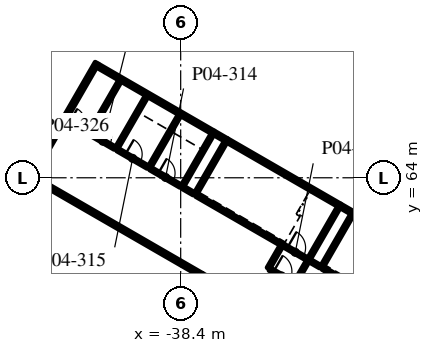
"""IFC4 building model, lengths in metres.
Left out: names, types, materials, properties, quantities, classifications, styles, units other than length and angle.
Written with IfcOpenShell. Run it as: python <this file> out.ifc"""

import sys

from ifc_helpers import new_model, si_unit, direction, frame, frame_2d, origin, place, context, subcontext, project, spatial, rectangle, extrude, element, fill, save


model = new_model("IFC4")
c1 = context("Model", 3, precision=1e-05, world=origin(), true_north=direction((0.0, 1.0)))
c2 = subcontext(c1, "Body", "Model", "MODEL_VIEW")
j1 = project(units=[si_unit("LENGTHUNIT", "METRE"), si_unit("PLANEANGLEUNIT", "RADIAN")], contexts=[c1])
p1 = place(None, origin())
s1 = spatial("IfcSite", under=j1, at=p1, CompositionType="ELEMENT")
p2 = place(p1, origin())
s2 = spatial("IfcBuilding", under=s1, at=p2, CompositionType="ELEMENT")
p3 = place(p2, frame((0.0, 0.0, 21.6)))
s3 = spatial("IfcBuildingStorey", under=s2, at=p3, CompositionType="ELEMENT", Elevation=21.6)
p4 = place(p3, frame((-48.228, 64.073, 0.0), z_axis=(0.0, 0.0, 1.0), x_axis=(0.499999331568, 0.866025789703, 0.0)))
e1 = element("IfcWall", 1, at=p4, inside=s3, PredefinedType="SOLIDWALL", context=c2, shape_type="SweptSolid", body=[
    extrude(rectangle(XDim=8.625, YDim=0.25, at=frame_2d((4.312, 0.0))), origin(), (0.0, 0.0, 1.0), 4.5),
])
p5 = place(p3, frame((-27.069, 61.672, 0.0), z_axis=(0.0, 0.0, 1.0), x_axis=(0.866021068297, -0.500007509209, 0.0)))
e2 = element("IfcWall", 2, at=p5, inside=s3, PredefinedType="SOLIDWALL", context=c2, shape_type="SweptSolid", body=[
    extrude(rectangle(XDim=8.6, YDim=0.25, at=frame_2d((4.3, 0.0))), origin(), (0.0, 0.0, 1.0), 4.5),
])
p6 = place(p3, frame((-35.383, 66.472, 0.0), z_axis=(0.0, 0.0, 1.0), x_axis=(0.866028165386, -0.499995216735, 0.0)))
e3 = element("IfcWall", 3, at=p6, inside=s3, PredefinedType="SOLIDWALL", context=c2, shape_type="SweptSolid", body=[
    extrude(rectangle(XDim=8.6, YDim=0.25, at=frame_2d((4.3, 0.0))), origin(), (0.0, 0.0, 1.0), 4.5),
])
p7 = place(p3, frame((-43.869, 71.372, 0.0), z_axis=(0.0, 0.0, 1.0), x_axis=(0.866025267465, -0.500000236112, 0.0)))
e4 = element("IfcWall", 4, at=p7, inside=s3, PredefinedType="SOLIDWALL", context=c2, shape_type="SweptSolid", body=[
    extrude(rectangle(XDim=8.8, YDim=0.25, at=frame_2d((4.4, 0.0))), origin(), (0.0, 0.0, 1.0), 4.5),
])
p8 = place(p3, frame((-48.119, 64.01, 0.0), z_axis=(0.0, 0.0, 1.0), x_axis=(0.866025499775, -0.499999833739, 0.0)))
e5 = element("IfcWall", 5, at=p8, inside=s3, PredefinedType="SOLIDWALL", context=c2, shape_type="SweptSolid", body=[
    extrude(rectangle(XDim=12.8, YDim=0.25, at=frame_2d((6.4, 0.0))), origin(), (0.0, 0.0, 1.0), 4.5),
])
for number, where, z_axis, x_axis in (
    (6, (-27.935, 62.172, 0.0), (0.0, 0.0, 1.0), (0.866, -0.5, 0.0)),
    (7, (-36.249, 66.972, 0.0), (0.0, 0.0, 1.0), (0.866, -0.5, 0.0)),
):
    element("IfcWall", number, at=place(p3, frame(where, z_axis=z_axis, x_axis=x_axis)), inside=s3, PredefinedType="SOLIDWALL", context=c2, shape_type="SweptSolid", body=[
        extrude(rectangle(XDim=1.0, YDim=0.25, at=frame_2d((0.5, 0.0))), origin(), (0.0, 0.0, 1.0), 4.5),
    ])
for number, where, z_axis, x_axis in (
    (8, (-27.131, 61.563, 0.0), (0.0, 0.0, 1.0), (-0.5, -0.866, 0.0)),
    (9, (-27.997, 62.063, 0.0), (0.0, 0.0, 1.0), (-0.5, -0.866, 0.0)),
    (10, (-35.445, 66.364, 0.0), (0.0, 0.0, 1.0), (-0.5, -0.866, 0.0)),
):
    element("IfcWall", number, at=place(p3, frame(where, z_axis=z_axis, x_axis=x_axis)), inside=s3, PredefinedType="SOLIDWALL", context=c2, shape_type="SweptSolid", body=[
        extrude(rectangle(XDim=4.0, YDim=0.2, at=frame_2d((2.0, 0.0))), origin(), (0.0, 0.0, 1.0), 4.5),
    ])
p9 = place(p3, frame((-23.285, 54.724, 0.0), z_axis=(0.0, 0.0, 1.0), x_axis=(-0.866027239912, 0.49999681972, 0.0)))
e11 = element("IfcWall", 11, at=p9, inside=s3, PredefinedType="SOLIDWALL", context=c2, shape_type="SweptSolid", body=[
    extrude(rectangle(XDim=6.65, YDim=0.2, at=frame_2d((3.325, 0.0))), origin(), (0.0, 0.0, 1.0), 4.5),
])
p10 = place(p3, frame((-31.599, 59.524, 0.0), z_axis=(0.0, 0.0, 1.0), x_axis=(0.866036909293, -0.499980071345, 0.0)))
e12 = element("IfcWall", 12, at=p10, inside=s3, PredefinedType="SOLIDWALL", context=c2, shape_type="SweptSolid", body=[
    extrude(rectangle(XDim=1.75, YDim=0.2, at=frame_2d((0.875, 0.0))), origin(), (0.0, 0.0, 1.0), 4.5),
])
p11 = place(p10, frame((0.25, 0.0, 0.0)))
e13 = element("IfcOpeningElement", 13, at=p11, cuts=e12, PredefinedType="OPENING", context=c2, shape_type="SweptSolid", body=[
    extrude(rectangle(XDim=1.2, YDim=2.1, at=frame_2d((0.6, 1.05))), frame((0.0, 0.11, 0.0), z_axis=(0.0, -1.0, 0.0), x_axis=(1.0, 0.0, 0.0)), (0.0, 0.0, 1.0), 0.22),
])
p12 = place(p3, frame((-31.599, 59.524, 0.0), z_axis=(0.0, 0.0, 1.0), x_axis=(-0.866027239912, 0.49999681972, 0.0)))
e14 = element("IfcWall", 14, at=p12, inside=s3, PredefinedType="SOLIDWALL", context=c2, shape_type="SweptSolid", body=[
    extrude(rectangle(XDim=6.65, YDim=0.2, at=frame_2d((3.325, 0.0))), origin(), (0.0, 0.0, 1.0), 4.5),
])
for number, where, z_axis, x_axis in (
    (15, (-36.311, 66.864, 0.0), (0.0, 0.0, 1.0), (-0.5, -0.866, 0.0)),
    (16, (-38.476, 68.114, 0.0), (0.0, 0.0, 1.0), (-0.5, -0.866, 0.0)),
    (17, (-40.641, 69.364, 0.0), (0.0, 0.0, 1.0), (-0.5, -0.866, 0.0)),
):
    element("IfcWall", number, at=place(p3, frame(where, z_axis=z_axis, x_axis=x_axis)), inside=s3, PredefinedType="SOLIDWALL", context=c2, shape_type="SweptSolid", body=[
        extrude(rectangle(XDim=4.0, YDim=0.2, at=frame_2d((2.0, 0.0))), origin(), (0.0, 0.0, 1.0), 4.5),
    ])
p13 = place(p3, frame((-40.389, 64.599, 0.0), z_axis=(0.0, 0.0, 1.0), x_axis=(0.86602648383, -0.499998129301, 0.0)))
e18 = element("IfcWall", 18, at=p13, inside=s3, PredefinedType="SOLIDWALL", context=c2, shape_type="SweptSolid", body=[
    extrude(rectangle(XDim=2.3, YDim=0.2, at=frame_2d((1.15, 0.0))), origin(), (0.0, 0.0, 1.0), 4.5),
])
p14 = place(p13, frame((0.6, 0.0, 0.0)))
e19 = element("IfcOpeningElement", 19, at=p14, cuts=e18, PredefinedType="OPENING", context=c2, shape_type="SweptSolid", body=[
    extrude(rectangle(XDim=1.1, YDim=2.1, at=frame_2d((0.55, 1.05))), frame((0.0, 0.11, 0.0), z_axis=(0.0, -1.0, 0.0), x_axis=(1.0, 0.0, 0.0)), (0.0, 0.0, 1.0), 0.22),
])
p15 = place(p3, frame((-42.554, 65.849, 0.0), z_axis=(0.0, 0.0, 1.0), x_axis=(0.86602648383, -0.499998129301, 0.0)))
e20 = element("IfcWall", 20, at=p15, inside=s3, PredefinedType="SOLIDWALL", context=c2, shape_type="SweptSolid", body=[
    extrude(rectangle(XDim=2.3, YDim=0.2, at=frame_2d((1.15, 0.0))), origin(), (0.0, 0.0, 1.0), 4.5),
])
p16 = place(p15, frame((0.6, 0.0, 0.0)))
e21 = element("IfcOpeningElement", 21, at=p16, cuts=e20, PredefinedType="OPENING", context=c2, shape_type="SweptSolid", body=[
    extrude(rectangle(XDim=1.1, YDim=2.1, at=frame_2d((0.55, 1.05))), frame((0.0, 0.11, 0.0), z_axis=(0.0, -1.0, 0.0), x_axis=(1.0, 0.0, 0.0)), (0.0, 0.0, 1.0), 0.22),
])
for number, where, z_axis, x_axis in (
    (22, (-30.047, 58.513, 0.0), (0.0, 0.0, 1.0), (-0.5, -0.866, 0.0)),
    (23, (-31.779, 59.513, 0.0), (0.0, 0.0, 1.0), (-0.5, -0.866, 0.0)),
):
    element("IfcWall", number, at=place(p3, frame(where, z_axis=z_axis, x_axis=x_axis)), inside=s3, PredefinedType="PARTITIONING", context=c2, shape_type="SweptSolid", body=[
        extrude(rectangle(XDim=1.7, YDim=0.2, at=frame_2d((0.85, 0.0))), origin(), (0.0, 0.0, 1.0), 4.5),
    ])
p17 = place(p3, frame((-32.542, 57.99, 0.0), z_axis=(0.0, 0.0, 1.0), x_axis=(0.866047807691, -0.499961193289, 0.0)))
e24 = element("IfcWall", 24, at=p17, inside=s3, PredefinedType="PARTITIONING", context=c2, shape_type="SweptSolid", body=[
    extrude(rectangle(XDim=1.8, YDim=0.2, at=frame_2d((0.9, 0.0))), origin(), (0.0, 0.0, 1.0), 4.5),
])
p18 = place(p17, frame((0.3, 0.0, 0.0)))
e25 = element("IfcOpeningElement", 25, at=p18, cuts=e24, PredefinedType="OPENING", context=c2, shape_type="SweptSolid", body=[
    extrude(rectangle(XDim=1.2, YDim=2.1, at=frame_2d((0.6, 1.05))), frame((0.0, 0.11, 0.0), z_axis=(0.0, -1.0, 0.0), x_axis=(1.0, 0.0, 0.0)), (0.0, 0.0, 1.0), 0.22),
])
p19 = place(p3, frame((-42.395, 70.376, 0.0), z_axis=(0.0, 0.0, 1.0), x_axis=(-0.49999894854, -0.866026010844, 0.0)))
e26 = element("IfcWall", 26, at=p19, inside=s3, PredefinedType="PARTITIONING", context=c2, shape_type="SweptSolid", body=[
    extrude(rectangle(XDim=4.0, YDim=0.2, at=frame_2d((2.0, 0.0))), origin(), (0.0, 0.0, 1.0), 4.5),
])
p20 = place(p3, frame((-44.308, 66.862, 0.0), z_axis=(0.0, 0.0, 1.0), x_axis=(0.866036312054, -0.499981105847, 0.0)))
e27 = element("IfcWall", 27, at=p20, inside=s3, PredefinedType="PARTITIONING", context=c2, shape_type="SweptSolid", body=[
    extrude(rectangle(XDim=1.825, YDim=0.2, at=frame_2d((0.912, 0.0))), origin(), (0.0, 0.0, 1.0), 4.5),
])
p21 = place(p20, frame((0.413, 0.0, 0.0)))
e28 = element("IfcOpeningElement", 28, at=p21, cuts=e27, PredefinedType="OPENING", context=c2, shape_type="SweptSolid", body=[
    extrude(rectangle(XDim=1.0, YDim=2.1, at=frame_2d((0.5, 1.05))), frame((0.0, 0.11, 0.0), z_axis=(0.0, -1.0, 0.0), x_axis=(1.0, 0.0, 0.0)), (0.0, 0.0, 1.0), 0.22),
])
p22 = place(p3, frame((-45.932, 67.799, 0.0), z_axis=(0.0, 0.0, 1.0), x_axis=(0.866027799164, -0.499995851058, 0.0)))
e29 = element("IfcWall", 29, at=p22, inside=s3, PredefinedType="PARTITIONING", context=c2, shape_type="SweptSolid", body=[
    extrude(rectangle(XDim=1.675, YDim=0.2, at=frame_2d((0.837, 0.0))), origin(), (0.0, 0.0, 1.0), 4.5),
])
p23 = place(p22, frame((0.262, 0.0, 0.0)))
e30 = element("IfcOpeningElement", 30, at=p23, cuts=e29, PredefinedType="OPENING", context=c2, shape_type="SweptSolid", body=[
    extrude(rectangle(XDim=1.0, YDim=2.1, at=frame_2d((0.5, 1.05))), frame((0.0, 0.11, 0.0), z_axis=(0.0, -1.0, 0.0), x_axis=(1.0, 0.0, 0.0)), (0.0, 0.0, 1.0), 0.22),
])
p24 = place(p3, frame((-29.218, 58.149, 0.0), z_axis=(0.0, 0.0, 1.0), x_axis=(-0.866017831539, 0.500013115284, 0.0)))
e31 = element("IfcWall", 31, at=p24, inside=s3, PredefinedType="PARTITIONING", context=c2, shape_type="SweptSolid", body=[
    extrude(rectangle(XDim=0.8, YDim=0.2, at=frame_2d((0.4, 0.0))), origin(), (0.0, 0.0, 1.0), 4.5),
])
p25 = place(p3, frame((-37.531, 62.949, 0.0), z_axis=(0.0, 0.0, 1.0), x_axis=(-0.866094119867, 0.499880961361, 0.0)))
e32 = element("IfcWall", 32, at=p25, inside=s3, PredefinedType="PARTITIONING", context=c2, shape_type="SweptSolid", body=[
    extrude(rectangle(XDim=0.8, YDim=0.2, at=frame_2d((0.4, 0.0))), origin(), (0.0, 0.0, 1.0), 4.5),
])
p26 = place(p11, origin())
e33 = element("IfcDoor", 33, at=p26, inside=s3, OperationType="SINGLE_SWING_LEFT", PredefinedType="DOOR", context=c2, shape_type="SweptSolid", body=[
    extrude(rectangle(XDim=1.2, YDim=2.1, at=frame_2d((0.6, 1.05))), frame((0.0, 0.025, 0.0), z_axis=(0.0, -1.0, 0.0), x_axis=(1.0, 0.0, 0.0)), (0.0, 0.0, 1.0), 0.05),
])
fill(e13, e33)
p27 = place(p14, origin())
e34 = element("IfcDoor", 34, at=p27, inside=s3, OperationType="DOUBLE_DOOR_SLIDING", PredefinedType="DOOR", context=c2, shape_type="SweptSolid", body=[
    extrude(rectangle(XDim=1.1, YDim=2.1, at=frame_2d((0.55, 1.05))), frame((0.0, 0.025, 0.0), z_axis=(0.0, -1.0, 0.0), x_axis=(1.0, 0.0, 0.0)), (0.0, 0.0, 1.0), 0.05),
])
fill(e19, e34)
p28 = place(p16, origin())
e35 = element("IfcDoor", 35, at=p28, inside=s3, OperationType="DOUBLE_DOOR_SLIDING", PredefinedType="DOOR", context=c2, shape_type="SweptSolid", body=[
    extrude(rectangle(XDim=1.1, YDim=2.1, at=frame_2d((0.55, 1.05))), frame((0.0, 0.025, 0.0), z_axis=(0.0, -1.0, 0.0), x_axis=(1.0, 0.0, 0.0)), (0.0, 0.0, 1.0), 0.05),
])
fill(e21, e35)
p29 = place(p18, origin())
e36 = element("IfcDoor", 36, at=p29, inside=s3, OperationType="SINGLE_SWING_LEFT", PredefinedType="DOOR", context=c2, shape_type="SweptSolid", body=[
    extrude(rectangle(XDim=1.2, YDim=2.1, at=frame_2d((0.6, 1.05))), frame((0.0, 0.025, 0.0), z_axis=(0.0, -1.0, 0.0), x_axis=(1.0, 0.0, 0.0)), (0.0, 0.0, 1.0), 0.05),
])
fill(e25, e36)
p30 = place(p21, origin())
e37 = element("IfcDoor", 37, at=p30, inside=s3, OperationType="SINGLE_SWING_LEFT", PredefinedType="DOOR", context=c2, shape_type="SweptSolid", body=[
    extrude(rectangle(XDim=1.0, YDim=2.1, at=frame_2d((0.5, 1.05))), frame((0.0, 0.025, 0.0), z_axis=(0.0, -1.0, 0.0), x_axis=(1.0, 0.0, 0.0)), (0.0, 0.0, 1.0), 0.05),
])
fill(e28, e37)
p31 = place(p23, origin())
e38 = element("IfcDoor", 38, at=p31, inside=s3, OperationType="SINGLE_SWING_LEFT", PredefinedType="DOOR", context=c2, shape_type="SweptSolid", body=[
    extrude(rectangle(XDim=1.0, YDim=2.1, at=frame_2d((0.5, 1.05))), frame((0.0, 0.025, 0.0), z_axis=(0.0, -1.0, 0.0), x_axis=(1.0, 0.0, 0.0)), (0.0, 0.0, 1.0), 0.05),
])
fill(e30, e38)
save(model, sys.argv[1])
